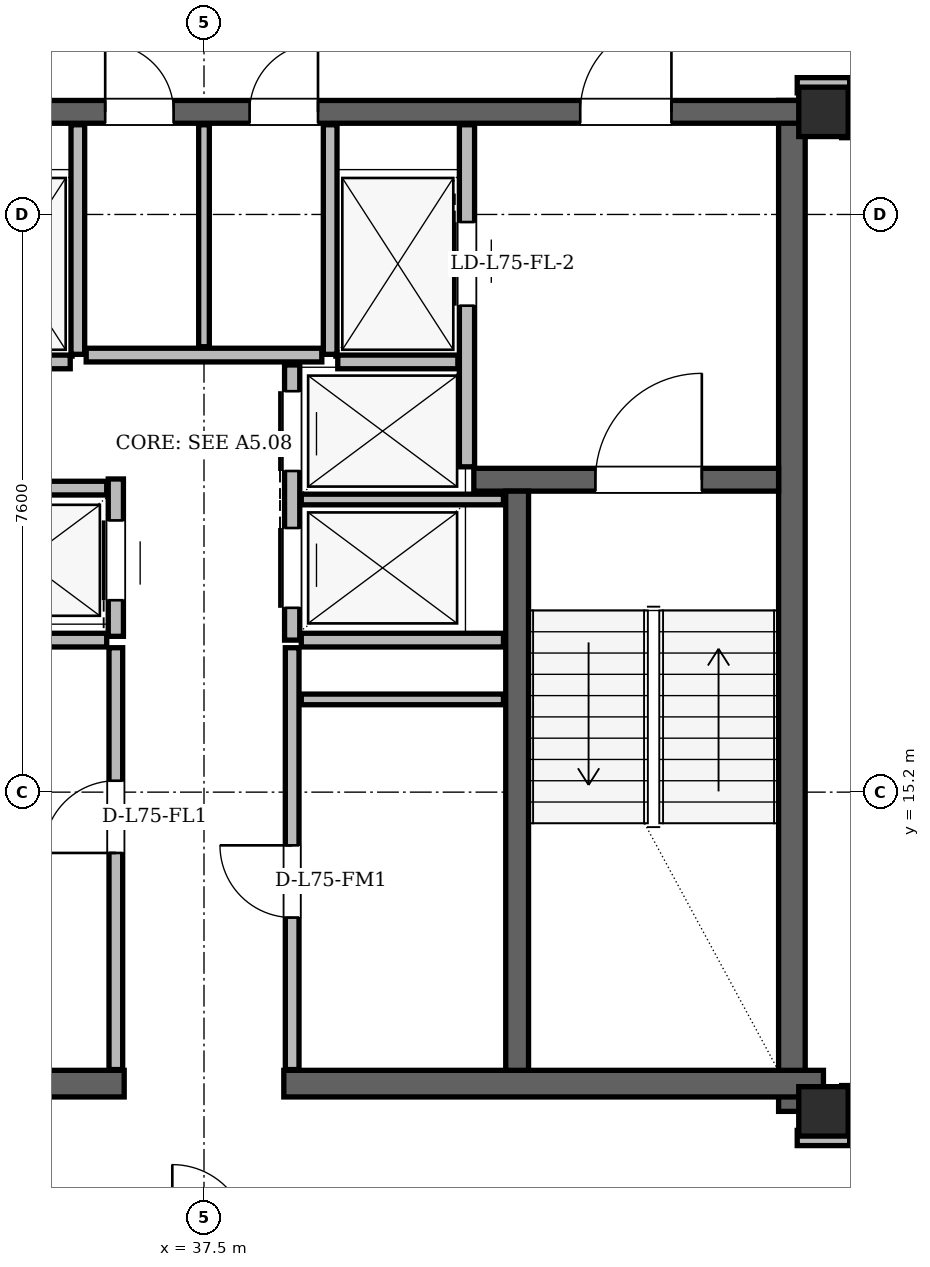
"""IFC4 building model, lengths in metres.
Left out: names, types, materials, properties, quantities, classifications, styles, units other than length and angle.
Written with IfcOpenShell. Run it as: python <this file> out.ifc"""

import sys

from ifc_helpers import new_model, si_unit, direction, frame, frame_2d, origin, origin_2d, place, context, subcontext, project, spatial, rectangle, hollow_rectangle, extrude, element, fill, save


model = new_model("IFC4")
c1 = context("Model", 3, precision=1e-05, world=origin(), true_north=direction((0.0, 1.0)))
c2 = subcontext(c1, "Body", "Model", "MODEL_VIEW")
j1 = project(units=[si_unit("LENGTHUNIT", "METRE"), si_unit("PLANEANGLEUNIT", "RADIAN")], contexts=[c1])
p1 = place(None, origin())
s1 = spatial("IfcSite", under=j1, at=p1, CompositionType="ELEMENT")
p2 = place(p1, origin())
s2 = spatial("IfcBuilding", under=s1, at=p2, CompositionType="ELEMENT")
p3 = place(p2, frame((0.0, 0.0, 285.0)))
s3 = spatial("IfcBuildingStorey", under=s2, at=p3, CompositionType="ELEMENT", Elevation=285.0)
for number, where, z_axis, x_axis in (
    (1, (45.65, 11.0, 0.0), (0.0, 0.0, 1.0), (1.0, 0.0, 0.0)),
    (2, (45.65, 24.15, 0.0), (0.0, 0.0, 1.0), (1.0, 0.0, 0.0)),
):
    element("IfcColumn", number, at=place(p3, frame(where, z_axis=z_axis, x_axis=x_axis)), inside=s3, PredefinedType="COLUMN", context=c2, shape_type="SweptSolid", body=[
        extrude(hollow_rectangle(XDim=0.65, YDim=0.65, WallThickness=0.05, at=origin_2d()), origin(), (0.0, 0.0, 1.0), 3.9),
    ])
p4 = place(p3, frame((45.235, 11.0, 0.0), z_axis=(0.0, 0.0, 1.0), x_axis=(0.0, 1.0, 0.0)))
e3 = element("IfcWall", 3, at=p4, inside=s3, PredefinedType="SHEAR", context=c2, shape_type="SweptSolid", body=[
    extrude(rectangle(XDim=13.3, YDim=0.35, at=frame_2d((6.65, 0.0))), origin(), (0.0, 0.0, 1.0), 3.68),
])
for number, where, z_axis, x_axis in (
    (4, (29.35, 11.365, 0.0), (0.0, 0.0, 1.0), (1.0, 0.0, 0.0)),
    (5, (38.55, 11.365, 0.0), (0.0, 0.0, 1.0), (1.0, 0.0, 0.0)),
):
    element("IfcWall", number, at=place(p3, frame(where, z_axis=z_axis, x_axis=x_axis)), inside=s3, PredefinedType="SHEAR", context=c2, shape_type="SweptSolid", body=[
        extrude(rectangle(XDim=7.1, YDim=0.35, at=frame_2d((3.55, 0.0))), origin(), (0.0, 0.0, 1.0), 3.68),
    ])
p5 = place(p3, frame((29.65, 24.15, 0.0), z_axis=(0.0, 0.0, 1.0), x_axis=(1.0, 0.0, 0.0)))
e6 = element("IfcWall", 6, at=p5, inside=s3, PredefinedType="SHEAR", context=c2, shape_type="SweptSolid", body=[
    extrude(rectangle(XDim=15.7, YDim=0.3, at=frame_2d((7.85, 0.0))), origin(), (0.0, 0.0, 1.0), 3.68),
])
p6 = place(p5, frame((1.7, 0.0, 0.0)))
e7 = element("IfcOpeningElement", 7, at=p6, cuts=e6, PredefinedType="OPENING", context=c2, shape_type="SweptSolid", body=[
    extrude(rectangle(XDim=1.2, YDim=2.2, at=frame_2d((0.6, 1.1))), frame((0.0, 0.15, 0.0), z_axis=(0.0, -1.0, 0.0), x_axis=(1.0, 0.0, 0.0)), (0.0, 0.0, 1.0), 0.3),
])
p7 = place(p5, frame((12.8, 0.0, 0.0)))
e8 = element("IfcOpeningElement", 8, at=p7, cuts=e6, PredefinedType="OPENING", context=c2, shape_type="SweptSolid", body=[
    extrude(rectangle(XDim=1.2, YDim=2.2, at=frame_2d((0.6, 1.1))), frame((0.0, 0.15, 0.0), z_axis=(0.0, -1.0, 0.0), x_axis=(1.0, 0.0, 0.0)), (0.0, 0.0, 1.0), 0.3),
])
p8 = place(p5, frame((6.55, 0.0, 0.0)))
e9 = element("IfcOpeningElement", 9, at=p8, cuts=e6, PredefinedType="OPENING", context=c2, shape_type="SweptSolid", body=[
    extrude(rectangle(XDim=0.9, YDim=2.05, at=frame_2d((0.45, 1.025))), frame((0.0, 0.15, 0.0), z_axis=(0.0, -1.0, 0.0), x_axis=(1.0, 0.0, 0.0)), (0.0, 0.0, 1.0), 0.3),
])
p9 = place(p5, frame((8.45, 0.0, 0.0)))
e10 = element("IfcOpeningElement", 10, at=p9, cuts=e6, PredefinedType="OPENING", context=c2, shape_type="SweptSolid", body=[
    extrude(rectangle(XDim=0.9, YDim=2.05, at=frame_2d((0.45, 1.025))), frame((0.0, 0.15, 0.0), z_axis=(0.0, -1.0, 0.0), x_axis=(1.0, 0.0, 0.0)), (0.0, 0.0, 1.0), 0.3),
])
p10 = place(p3, frame((41.05, 19.31, 0.0), z_axis=(0.0, 0.0, 1.0), x_axis=(1.0, 0.0, 0.0)))
e11 = element("IfcWall", 11, at=p10, inside=s3, PredefinedType="SHEAR", context=c2, shape_type="SweptSolid", body=[
    extrude(rectangle(XDim=4.01, YDim=0.3, at=frame_2d((2.005, 0.0))), origin(), (0.0, 0.0, 1.0), 3.68),
])
p11 = place(p10, frame((1.6, 0.0, 0.0)))
e12 = element("IfcOpeningElement", 12, at=p11, cuts=e11, PredefinedType="OPENING", context=c2, shape_type="SweptSolid", body=[
    extrude(rectangle(XDim=1.4, YDim=2.2, at=frame_2d((0.7, 1.1))), frame((0.0, 0.15, 0.0), z_axis=(0.0, -1.0, 0.0), x_axis=(1.0, 0.0, 0.0)), (0.0, 0.0, 1.0), 0.3),
])
p12 = place(p3, frame((41.62, 11.54, 0.0), z_axis=(0.0, 0.0, 1.0), x_axis=(0.0, 1.0, 0.0)))
e13 = element("IfcWall", 13, at=p12, inside=s3, PredefinedType="SHEAR", context=c2, shape_type="SweptSolid", body=[
    extrude(rectangle(XDim=7.62, YDim=0.3, at=frame_2d((3.81, 0.0))), origin(), (0.0, 0.0, 1.0), 3.68),
])
p13 = place(p3, frame((58.415, 10.535, 0.0), z_axis=(0.0, 0.0, 1.0), x_axis=(-0.499999864727, 0.866025481884, 0.0)))
e14 = element("IfcWall", 14, at=p13, inside=s3, PredefinedType="SOLIDWALL", context=c2, shape_type="SweptSolid", body=[
    extrude(rectangle(XDim=37.481, YDim=0.29, at=frame_2d((18.74, 0.0))), origin(), (0.0, 0.0, 1.0), 3.058),
])
p14 = place(p13, frame((7.504, 0.0, 0.0)))
e15 = element("IfcOpeningElement", 15, at=p14, cuts=e14, PredefinedType="OPENING", context=c2, shape_type="SweptSolid", body=[
    extrude(rectangle(XDim=1.3, YDim=2.2, at=frame_2d((0.65, 1.1))), frame((0.0, 0.145, 0.0), z_axis=(0.0, -1.0, 0.0), x_axis=(1.0, 0.0, 0.0)), (0.0, 0.0, 1.0), 0.29),
])
p15 = place(p13, frame((32.341, 0.0, 0.0)))
e16 = element("IfcOpeningElement", 16, at=p15, cuts=e14, PredefinedType="OPENING", context=c2, shape_type="SweptSolid", body=[
    extrude(rectangle(XDim=1.5, YDim=2.2, at=frame_2d((0.75, 1.1))), frame((0.0, 0.145, 0.0), z_axis=(0.0, -1.0, 0.0), x_axis=(1.0, 0.0, 0.0)), (0.0, 0.0, 1.0), 0.29),
])
p16 = place(p13, frame((12.54, 0.0, 0.85)))
e17 = element("IfcOpeningElement", 17, at=p16, cuts=e14, PredefinedType="OPENING", context=c2, shape_type="SweptSolid", body=[
    extrude(rectangle(XDim=1.4, YDim=1.6, at=frame_2d((0.7, 0.8))), frame((0.0, 0.145, 0.0), z_axis=(0.0, -1.0, 0.0), x_axis=(1.0, 0.0, 0.0)), (0.0, 0.0, 1.0), 0.29),
])
p17 = place(p13, frame((17.705, 0.0, 0.85)))
e18 = element("IfcOpeningElement", 18, at=p17, cuts=e14, PredefinedType="OPENING", context=c2, shape_type="SweptSolid", body=[
    extrude(rectangle(XDim=2.5, YDim=2.098, at=frame_2d((1.25, 1.049))), frame((0.0, 0.145, 0.0), z_axis=(0.0, -1.0, 0.0), x_axis=(1.0, 0.0, 0.0)), (0.0, 0.0, 1.0), 0.29),
])
p18 = place(p13, frame((2.467, 0.0, 0.85)))
e19 = element("IfcOpeningElement", 19, at=p18, cuts=e14, PredefinedType="OPENING", context=c2, shape_type="SweptSolid", body=[
    extrude(rectangle(XDim=2.5, YDim=2.098, at=frame_2d((1.25, 1.049))), frame((0.0, 0.145, 0.0), z_axis=(0.0, -1.0, 0.0), x_axis=(1.0, 0.0, 0.0)), (0.0, 0.0, 1.0), 0.29),
])
p19 = place(p13, frame((27.081, 0.0, 0.85)))
e20 = element("IfcOpeningElement", 20, at=p19, cuts=e14, PredefinedType="OPENING", context=c2, shape_type="SweptSolid", body=[
    extrude(rectangle(XDim=1.2, YDim=1.48, at=frame_2d((0.6, 0.74))), frame((0.0, 0.145, 0.0), z_axis=(0.0, -1.0, 0.0), x_axis=(1.0, 0.0, 0.0)), (0.0, 0.0, 1.0), 0.29),
])
p20 = place(p13, frame((34.388, 0.0, 0.85)))
e21 = element("IfcOpeningElement", 21, at=p20, cuts=e14, PredefinedType="OPENING", context=c2, shape_type="SweptSolid", body=[
    extrude(rectangle(XDim=1.8, YDim=1.75, at=frame_2d((0.9, 0.875))), frame((0.0, 0.145, 0.0), z_axis=(0.0, -1.0, 0.0), x_axis=(1.0, 0.0, 0.0)), (0.0, 0.0, 1.0), 0.29),
])
p21 = place(p13, frame((22.312, 0.0, 0.85)))
e22 = element("IfcOpeningElement", 22, at=p21, cuts=e14, PredefinedType="OPENING", context=c2, shape_type="SweptSolid", body=[
    extrude(rectangle(XDim=1.2, YDim=1.48, at=frame_2d((0.6, 0.74))), frame((0.0, 0.145, 0.0), z_axis=(0.0, -1.0, 0.0), x_axis=(1.0, 0.0, 0.0)), (0.0, 0.0, 1.0), 0.29),
])
p22 = place(p3, frame((35.84, 20.96, 0.0), z_axis=(0.0, 0.0, 1.0), x_axis=(0.0, 1.0, 0.0)))
e23 = element("IfcWall", 23, at=p22, inside=s3, PredefinedType="PARTITIONING", context=c2, shape_type="SweptSolid", body=[
    extrude(rectangle(XDim=3.02, YDim=0.18, at=frame_2d((1.51, 0.0))), origin(), (0.0, 0.0, 1.0), 3.68),
])
p23 = place(p3, frame((34.16, 20.86, 0.0), z_axis=(0.0, 0.0, 1.0), x_axis=(1.0, 0.0, 0.0)))
e24 = element("IfcWall", 24, at=p23, inside=s3, PredefinedType="PARTITIONING", context=c2, shape_type="SweptSolid", body=[
    extrude(rectangle(XDim=1.58, YDim=0.18, at=frame_2d((0.79, 0.0))), origin(), (0.0, 0.0, 1.0), 3.68),
])
p24 = place(p3, frame((40.96, 19.48, 0.0), z_axis=(0.0, 0.0, 1.0), x_axis=(0.0, 1.0, 0.0)))
e25 = element("IfcWall", 25, at=p24, inside=s3, PredefinedType="PARTITIONING", context=c2, shape_type="SweptSolid", body=[
    extrude(rectangle(XDim=4.5, YDim=0.2, at=frame_2d((2.25, 0.0))), origin(), (0.0, 0.0, 1.0), 3.68),
])
p25 = place(p24, frame((2.12, 0.0, 0.0)))
e26 = element("IfcOpeningElement", 26, at=p25, cuts=e25, PredefinedType="OPENING", context=c2, shape_type="SweptSolid", body=[
    extrude(rectangle(XDim=1.1, YDim=2.2, at=frame_2d((0.55, 1.1))), frame((0.0, 0.1, 0.0), z_axis=(0.0, -1.0, 0.0), x_axis=(1.0, 0.0, 0.0)), (0.0, 0.0, 1.0), 0.2),
])
p26 = place(p3, frame((39.16, 20.96, 0.0), z_axis=(0.0, 0.0, 1.0), x_axis=(0.0, 1.0, 0.0)))
e27 = element("IfcWall", 27, at=p26, inside=s3, PredefinedType="PARTITIONING", context=c2, shape_type="SweptSolid", body=[
    extrude(rectangle(XDim=3.02, YDim=0.18, at=frame_2d((1.51, 0.0))), origin(), (0.0, 0.0, 1.0), 3.68),
])
p27 = place(p3, frame((39.26, 20.86, 0.0), z_axis=(0.0, 0.0, 1.0), x_axis=(1.0, 0.0, 0.0)))
e28 = element("IfcWall", 28, at=p27, inside=s3, PredefinedType="PARTITIONING", context=c2, shape_type="SweptSolid", body=[
    extrude(rectangle(XDim=1.58, YDim=0.18, at=frame_2d((0.79, 0.0))), origin(), (0.0, 0.0, 1.0), 3.68),
])
p28 = place(p3, frame((36.34, 17.25, 0.0), z_axis=(0.0, 0.0, 1.0), x_axis=(0.0, 1.0, 0.0)))
e29 = element("IfcWall", 29, at=p28, inside=s3, PredefinedType="PARTITIONING", context=c2, shape_type="SweptSolid", body=[
    extrude(rectangle(XDim=2.07, YDim=0.2, at=frame_2d((1.035, 0.0))), origin(), (0.0, 0.0, 1.0), 3.68),
])
p29 = place(p28, frame((0.475, 0.0, 0.0)))
e30 = element("IfcOpeningElement", 30, at=p29, cuts=e29, PredefinedType="OPENING", context=c2, shape_type="SweptSolid", body=[
    extrude(rectangle(XDim=1.05, YDim=2.15, at=frame_2d((0.525, 1.075))), frame((0.0, 0.1, 0.0), z_axis=(0.0, -1.0, 0.0), x_axis=(1.0, 0.0, 0.0)), (0.0, 0.0, 1.0), 0.2),
])
p30 = place(p3, frame((33.95, 19.2, 0.0), z_axis=(0.0, 0.0, 1.0), x_axis=(1.0, 0.0, 0.0)))
e31 = element("IfcWall", 31, at=p30, inside=s3, PredefinedType="PARTITIONING", context=c2, shape_type="SweptSolid", body=[
    extrude(rectangle(XDim=2.27, YDim=0.18, at=frame_2d((1.135, 0.0))), origin(), (0.0, 0.0, 1.0), 3.68),
])
p31 = place(p3, frame((33.56, 17.2, 0.0), z_axis=(0.0, 0.0, 1.0), x_axis=(1.0, 0.0, 0.0)))
e32 = element("IfcWall", 32, at=p31, inside=s3, PredefinedType="PARTITIONING", context=c2, shape_type="SweptSolid", body=[
    extrude(rectangle(XDim=2.66, YDim=0.18, at=frame_2d((1.33, 0.0))), origin(), (0.0, 0.0, 1.0), 3.68),
])
p32 = place(p3, frame((36.34, 11.55, 0.0), z_axis=(0.0, 0.0, 1.0), x_axis=(0.0, 1.0, 0.0)))
e33 = element("IfcWall", 33, at=p32, inside=s3, PredefinedType="PARTITIONING", context=c2, shape_type="SweptSolid", body=[
    extrude(rectangle(XDim=5.55, YDim=0.18, at=frame_2d((2.775, 0.0))), origin(), (0.0, 0.0, 1.0), 3.68),
])
p33 = place(p32, frame((2.85, 0.0, 0.0)))
e34 = element("IfcOpeningElement", 34, at=p33, cuts=e33, PredefinedType="OPENING", context=c2, shape_type="SweptSolid", body=[
    extrude(rectangle(XDim=0.95, YDim=2.1, at=frame_2d((0.475, 1.05))), frame((0.0, 0.09, 0.0), z_axis=(0.0, -1.0, 0.0), x_axis=(1.0, 0.0, 0.0)), (0.0, 0.0, 1.0), 0.18),
])
p34 = place(p3, frame((38.66, 17.2, 0.0), z_axis=(0.0, 0.0, 1.0), x_axis=(0.0, 1.0, 0.0)))
e35 = element("IfcWall", 35, at=p34, inside=s3, PredefinedType="PARTITIONING", context=c2, shape_type="SweptSolid", body=[
    extrude(rectangle(XDim=3.62, YDim=0.2, at=frame_2d((1.81, 0.0))), origin(), (0.0, 0.0, 1.0), 3.68),
])
p35 = place(p34, frame((0.425, 0.0, 0.0)))
e36 = element("IfcOpeningElement", 36, at=p35, cuts=e35, PredefinedType="OPENING", context=c2, shape_type="SweptSolid", body=[
    extrude(rectangle(XDim=1.05, YDim=2.15, at=frame_2d((0.525, 1.075))), frame((0.0, 0.1, 0.0), z_axis=(0.0, -1.0, 0.0), x_axis=(1.0, 0.0, 0.0)), (0.0, 0.0, 1.0), 0.2),
])
p36 = place(p34, frame((2.225, 0.0, 0.0)))
e37 = element("IfcOpeningElement", 37, at=p36, cuts=e35, PredefinedType="OPENING", context=c2, shape_type="SweptSolid", body=[
    extrude(rectangle(XDim=1.05, YDim=2.15, at=frame_2d((0.525, 1.075))), frame((0.0, 0.1, 0.0), z_axis=(0.0, -1.0, 0.0), x_axis=(1.0, 0.0, 0.0)), (0.0, 0.0, 1.0), 0.2),
])
p37 = place(p3, frame((38.78, 17.2, 0.0), z_axis=(0.0, 0.0, 1.0), x_axis=(1.0, 0.0, 0.0)))
e38 = element("IfcWall", 38, at=p37, inside=s3, PredefinedType="PARTITIONING", context=c2, shape_type="SweptSolid", body=[
    extrude(rectangle(XDim=2.66, YDim=0.18, at=frame_2d((1.33, 0.0))), origin(), (0.0, 0.0, 1.0), 3.68),
])
p38 = place(p3, frame((38.78, 19.05, 0.0), z_axis=(0.0, 0.0, 1.0), x_axis=(1.0, 0.0, 0.0)))
e39 = element("IfcWall", 39, at=p38, inside=s3, PredefinedType="PARTITIONING", context=c2, shape_type="SweptSolid", body=[
    extrude(rectangle(XDim=2.66, YDim=0.14, at=frame_2d((1.33, 0.0))), origin(), (0.0, 0.0, 1.0), 3.68),
])
p39 = place(p3, frame((38.66, 11.55, 0.0), z_axis=(0.0, 0.0, 1.0), x_axis=(0.0, 1.0, 0.0)))
e40 = element("IfcWall", 40, at=p39, inside=s3, PredefinedType="PARTITIONING", context=c2, shape_type="SweptSolid", body=[
    extrude(rectangle(XDim=5.55, YDim=0.18, at=frame_2d((2.775, 0.0))), origin(), (0.0, 0.0, 1.0), 3.68),
])
p40 = place(p39, frame((2.0, 0.0, 0.0)))
e41 = element("IfcOpeningElement", 41, at=p40, cuts=e40, PredefinedType="OPENING", context=c2, shape_type="SweptSolid", body=[
    extrude(rectangle(XDim=0.95, YDim=2.1, at=frame_2d((0.475, 1.05))), frame((0.0, 0.09, 0.0), z_axis=(0.0, -1.0, 0.0), x_axis=(1.0, 0.0, 0.0)), (0.0, 0.0, 1.0), 0.18),
])
p41 = place(p3, frame((38.78, 16.42, 0.0), z_axis=(0.0, 0.0, 1.0), x_axis=(1.0, 0.0, 0.0)))
e42 = element("IfcWall", 42, at=p41, inside=s3, PredefinedType="PARTITIONING", context=c2, shape_type="SweptSolid", body=[
    extrude(rectangle(XDim=2.66, YDim=0.14, at=frame_2d((1.33, 0.0))), origin(), (0.0, 0.0, 1.0), 3.68),
])
p42 = place(p3, frame((35.95, 20.95, 0.0), z_axis=(0.0, 0.0, 1.0), x_axis=(1.0, 0.0, 0.0)))
e43 = element("IfcWall", 43, at=p42, inside=s3, PredefinedType="PARTITIONING", context=c2, shape_type="SweptSolid", body=[
    extrude(rectangle(XDim=3.1, YDim=0.18, at=frame_2d((1.55, 0.0))), origin(), (0.0, 0.0, 1.0), 3.68),
])
p43 = place(p3, frame((37.5, 21.06, 0.0), z_axis=(0.0, 0.0, 1.0), x_axis=(0.0, 1.0, 0.0)))
e44 = element("IfcWall", 44, at=p43, inside=s3, PredefinedType="PARTITIONING", context=c2, shape_type="SweptSolid", body=[
    extrude(rectangle(XDim=2.92, YDim=0.14, at=frame_2d((1.46, 0.0))), origin(), (0.0, 0.0, 1.0), 3.68),
])
p44 = place(p3, frame((45.305, 10.65, 0.0), z_axis=(0.0, 0.0, 1.0), x_axis=(1.0, 0.0, 0.0)))
e45 = element("IfcWall", 45, at=p44, inside=s3, PredefinedType="PARTITIONING", context=c2, shape_type="SweptSolid", body=[
    extrude(rectangle(XDim=0.69, YDim=0.2, at=frame_2d((0.345, 0.0))), origin(), (0.0, 0.0, 1.0), 3.68),
])
p45 = place(p3, frame((45.305, 24.5, 0.0), z_axis=(0.0, 0.0, 1.0), x_axis=(1.0, 0.0, 0.0)))
e46 = element("IfcWall", 46, at=p45, inside=s3, PredefinedType="PARTITIONING", context=c2, shape_type="SweptSolid", body=[
    extrude(rectangle(XDim=0.69, YDim=0.2, at=frame_2d((0.345, 0.0))), origin(), (0.0, 0.0, 1.0), 3.266),
])
p46 = place(p3, frame((45.99, 10.95, 0.0), z_axis=(0.0, 0.0, 1.0), x_axis=(0.0, 1.0, 0.0)))
e47 = element("IfcWall", 47, at=p46, inside=s3, PredefinedType="PARTITIONING", context=c2, shape_type="SweptSolid", body=[
    extrude(rectangle(XDim=0.39, YDim=0.2, at=frame_2d((0.195, 0.0))), origin(), (0.0, 0.0, 1.0), 3.68),
])
p47 = place(p3, frame((45.99, 23.81, 0.0), z_axis=(0.0, 0.0, 1.0), x_axis=(0.0, 1.0, 0.0)))
e48 = element("IfcWall", 48, at=p47, inside=s3, PredefinedType="PARTITIONING", context=c2, shape_type="SweptSolid", body=[
    extrude(rectangle(XDim=0.51, YDim=0.2, at=frame_2d((0.255, 0.0))), origin(), (0.0, 0.0, 1.0), 3.68),
])
p48 = place(p33, origin())
e49 = element("IfcDoor", 49, at=p48, inside=s3, OperationType="SINGLE_SWING_LEFT", PredefinedType="DOOR", context=c2, shape_type="SweptSolid", body=[
    extrude(rectangle(XDim=0.95, YDim=2.1, at=frame_2d((0.475, 1.05))), frame((0.0, 0.025, 0.0), z_axis=(0.0, -1.0, 0.0), x_axis=(1.0, 0.0, 0.0)), (0.0, 0.0, 1.0), 0.05),
])
fill(e34, e49)
p49 = place(p40, origin())
e50 = element("IfcDoor", 50, at=p49, inside=s3, OperationType="SINGLE_SWING_RIGHT", PredefinedType="DOOR", context=c2, shape_type="SweptSolid", body=[
    extrude(rectangle(XDim=0.95, YDim=2.1, at=frame_2d((0.475, 1.05))), frame((0.0, 0.025, 0.0), z_axis=(0.0, -1.0, 0.0), x_axis=(1.0, 0.0, 0.0)), (0.0, 0.0, 1.0), 0.05),
])
fill(e41, e50)
p50 = place(p25, origin())
e51 = element("IfcDoor", 51, at=p50, inside=s3, OperationType="SLIDING_TO_RIGHT", PredefinedType="DOOR", context=c2, shape_type="SweptSolid", body=[
    extrude(rectangle(XDim=1.1, YDim=2.2, at=frame_2d((0.55, 1.1))), frame((0.0, 0.025, 0.0), z_axis=(0.0, -1.0, 0.0), x_axis=(1.0, 0.0, 0.0)), (0.0, 0.0, 1.0), 0.05),
])
fill(e26, e51)
p51 = place(p29, origin())
e52 = element("IfcDoor", 52, at=p51, inside=s3, OperationType="SLIDING_TO_LEFT", PredefinedType="DOOR", context=c2, shape_type="SweptSolid", body=[
    extrude(rectangle(XDim=1.05, YDim=2.15, at=frame_2d((0.525, 1.075))), frame((0.0, 0.025, 0.0), z_axis=(0.0, -1.0, 0.0), x_axis=(1.0, 0.0, 0.0)), (0.0, 0.0, 1.0), 0.05),
])
fill(e30, e52)
p52 = place(p35, origin())
e53 = element("IfcDoor", 53, at=p52, inside=s3, OperationType="SLIDING_TO_RIGHT", PredefinedType="DOOR", context=c2, shape_type="SweptSolid", body=[
    extrude(rectangle(XDim=1.05, YDim=2.15, at=frame_2d((0.525, 1.075))), frame((0.0, 0.025, 0.0), z_axis=(0.0, -1.0, 0.0), x_axis=(1.0, 0.0, 0.0)), (0.0, 0.0, 1.0), 0.05),
])
fill(e36, e53)
p53 = place(p36, origin())
e54 = element("IfcDoor", 54, at=p53, inside=s3, OperationType="SLIDING_TO_LEFT", PredefinedType="DOOR", context=c2, shape_type="SweptSolid", body=[
    extrude(rectangle(XDim=1.05, YDim=2.15, at=frame_2d((0.525, 1.075))), frame((0.0, 0.025, 0.0), z_axis=(0.0, -1.0, 0.0), x_axis=(1.0, 0.0, 0.0)), (0.0, 0.0, 1.0), 0.05),
])
fill(e37, e54)
p54 = place(p11, origin())
e55 = element("IfcDoor", 55, at=p54, inside=s3, OperationType="SINGLE_SWING_RIGHT", PredefinedType="DOOR", context=c2, shape_type="SweptSolid", body=[
    extrude(rectangle(XDim=1.4, YDim=2.2, at=frame_2d((0.7, 1.1))), frame((0.0, 0.025, 0.0), z_axis=(0.0, -1.0, 0.0), x_axis=(1.0, 0.0, 0.0)), (0.0, 0.0, 1.0), 0.05),
])
fill(e12, e55)
p55 = place(p7, origin())
e56 = element("IfcDoor", 56, at=p55, inside=s3, OperationType="SINGLE_SWING_RIGHT", PredefinedType="DOOR", context=c2, shape_type="SweptSolid", body=[
    extrude(rectangle(XDim=1.2, YDim=2.2, at=frame_2d((0.6, 1.1))), frame((0.0, 0.025, 0.0), z_axis=(0.0, -1.0, 0.0), x_axis=(1.0, 0.0, 0.0)), (0.0, 0.0, 1.0), 0.05),
])
fill(e8, e56)
p56 = place(p8, origin())
e57 = element("IfcDoor", 57, at=p56, inside=s3, OperationType="SINGLE_SWING_LEFT", PredefinedType="DOOR", context=c2, shape_type="SweptSolid", body=[
    extrude(rectangle(XDim=0.9, YDim=2.05, at=frame_2d((0.45, 1.025))), frame((0.0, 0.025, 0.0), z_axis=(0.0, -1.0, 0.0), x_axis=(1.0, 0.0, 0.0)), (0.0, 0.0, 1.0), 0.05),
])
fill(e9, e57)
p57 = place(p9, origin())
e58 = element("IfcDoor", 58, at=p57, inside=s3, OperationType="SINGLE_SWING_RIGHT", PredefinedType="DOOR", context=c2, shape_type="SweptSolid", body=[
    extrude(rectangle(XDim=0.9, YDim=2.05, at=frame_2d((0.45, 1.025))), frame((0.0, 0.025, 0.0), z_axis=(0.0, -1.0, 0.0), x_axis=(1.0, 0.0, 0.0)), (0.0, 0.0, 1.0), 0.05),
])
fill(e10, e58)
save(model, sys.argv[1])
